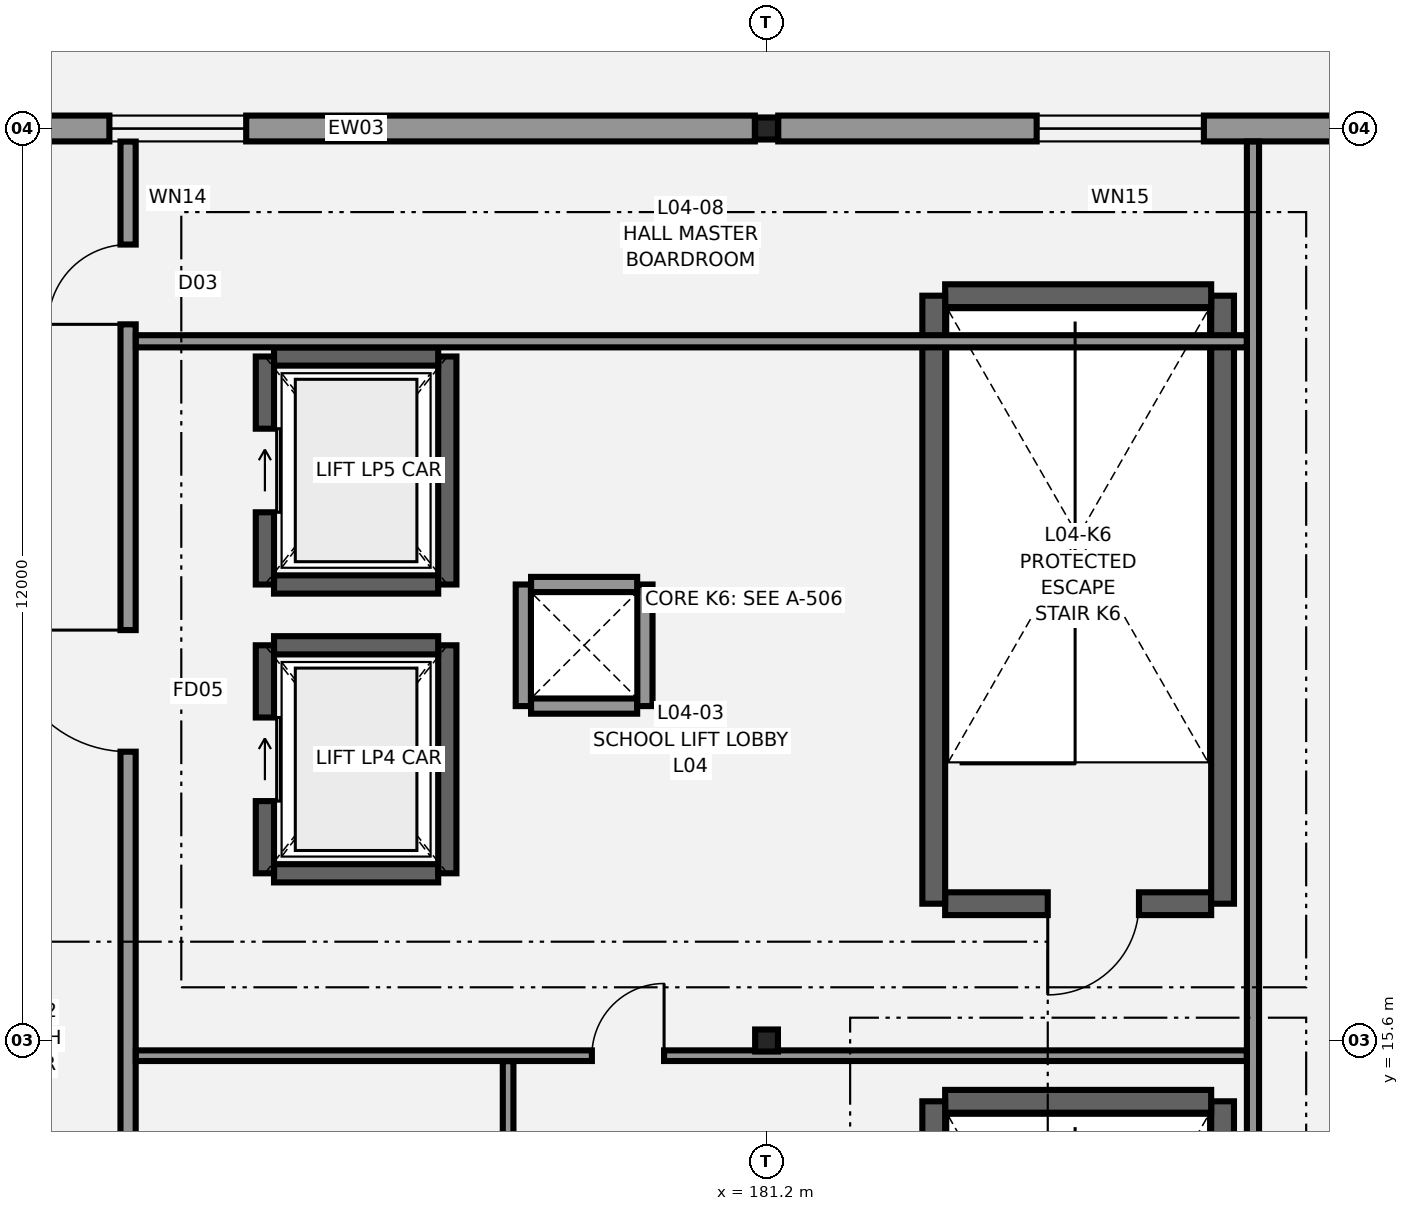
"""IFC4 building model, lengths in metres.
Left out: names, types, materials, properties, quantities, classifications, styles, units other than length and angle.
Written with IfcOpenShell. Run it as: python <this file> out.ifc"""

import sys

from ifc_helpers import new_model, si_unit, direction, frame, frame_2d, origin, origin_2d, place, context, subcontext, project, spatial, rectangle, i_section, extrude, element, fill, save


model = new_model("IFC4")
c1 = context("Model", 3, precision=1e-05, world=origin(), true_north=direction((0.0, 1.0)))
c2 = subcontext(c1, "Body", "Model", "MODEL_VIEW")
j1 = project(units=[si_unit("LENGTHUNIT", "METRE"), si_unit("PLANEANGLEUNIT", "RADIAN")], contexts=[c1])
p1 = place(None, origin())
s1 = spatial("IfcSite", under=j1, at=p1, CompositionType="ELEMENT")
p2 = place(p1, origin())
s2 = spatial("IfcBuilding", under=s1, at=p2, CompositionType="ELEMENT")
p3 = place(p2, frame((0.0, 0.0, 18.6)))
s3 = spatial("IfcBuildingStorey", under=s2, at=p3, CompositionType="ELEMENT", Elevation=18.6)
for number, where, z_axis, x_axis in (
    (1, (181.2, 15.6, 0.0), (0.0, 0.0, 1.0), (1.0, 0.0, 0.0)),
    (2, (181.2, 27.6, 0.0), (0.0, 0.0, 1.0), (1.0, 0.0, 0.0)),
):
    element("IfcColumn", number, at=place(p3, frame(where, z_axis=z_axis, x_axis=x_axis)), inside=s3, PredefinedType="COLUMN", context=c2, shape_type="SweptSolid", body=[
        extrude(i_section(OverallWidth=0.3, OverallDepth=0.29, WebThickness=0.009, FlangeThickness=0.014, FilletRadius=0.027, at=origin_2d()), origin(), (0.0, 0.0, 1.0), 2.9),
    ])
p4 = place(p3, frame((187.2, 6.8, 0.0), z_axis=(0.0, 0.0, 1.0), x_axis=(0.0, 1.0, 0.0)))
e3 = element("IfcWall", 3, at=p4, inside=s3, PredefinedType="SHEAR", context=c2, shape_type="SweptSolid", body=[
    extrude(rectangle(XDim=8.0, YDim=0.3, at=frame_2d((4.0, 0.0))), origin(), (0.0, 0.0, 1.0), 2.7),
])
p5 = place(p3, frame((187.05, 14.8, 0.0), z_axis=(0.0, 0.0, 1.0), x_axis=(-1.0, 0.0, 0.0)))
e4 = element("IfcWall", 4, at=p5, inside=s3, PredefinedType="SHEAR", context=c2, shape_type="SweptSolid", body=[
    extrude(rectangle(XDim=3.5, YDim=0.3, at=frame_2d((1.75, 0.0))), origin(), (0.0, 0.0, 1.0), 2.7),
])
p6 = place(p3, frame((183.4, 14.8, 0.0), z_axis=(0.0, 0.0, 1.0), x_axis=(0.0, -1.0, 0.0)))
e5 = element("IfcWall", 5, at=p6, inside=s3, PredefinedType="SHEAR", context=c2, shape_type="SweptSolid", body=[
    extrude(rectangle(XDim=8.0, YDim=0.3, at=frame_2d((4.0, 0.0))), origin(), (0.0, 0.0, 1.0), 2.7),
])
p7 = place(p3, frame((187.05, 17.4, 0.0), z_axis=(0.0, 0.0, 1.0), x_axis=(-1.0, 0.0, 0.0)))
e6 = element("IfcWall", 6, at=p7, inside=s3, PredefinedType="SHEAR", context=c2, shape_type="SweptSolid", body=[
    extrude(rectangle(XDim=3.5, YDim=0.3, at=frame_2d((1.75, 0.0))), origin(), (0.0, 0.0, 1.0), 2.7),
])
p8 = place(p7, frame((0.95, 0.0, 0.0)))
e7 = element("IfcOpeningElement", 7, at=p8, cuts=e6, PredefinedType="OPENING", context=c2, shape_type="SweptSolid", body=[
    extrude(rectangle(XDim=1.2, YDim=2.2, at=frame_2d((0.6, 1.1))), frame((0.0, 0.16, 0.0), z_axis=(0.0, -1.0, 0.0), x_axis=(1.0, 0.0, 0.0)), (0.0, 0.0, 1.0), 0.32),
])
p9 = place(p3, frame((187.2, 17.4, 0.0), z_axis=(0.0, 0.0, 1.0), x_axis=(0.0, 1.0, 0.0)))
e8 = element("IfcWall", 8, at=p9, inside=s3, PredefinedType="SHEAR", context=c2, shape_type="SweptSolid", body=[
    extrude(rectangle(XDim=8.0, YDim=0.3, at=frame_2d((4.0, 0.0))), origin(), (0.0, 0.0, 1.0), 2.7),
])
p10 = place(p3, frame((187.05, 25.4, 0.0), z_axis=(0.0, 0.0, 1.0), x_axis=(-1.0, 0.0, 0.0)))
e9 = element("IfcWall", 9, at=p10, inside=s3, PredefinedType="SHEAR", context=c2, shape_type="SweptSolid", body=[
    extrude(rectangle(XDim=3.5, YDim=0.3, at=frame_2d((1.75, 0.0))), origin(), (0.0, 0.0, 1.0), 2.7),
])
p11 = place(p3, frame((183.4, 25.4, 0.0), z_axis=(0.0, 0.0, 1.0), x_axis=(0.0, -1.0, 0.0)))
e10 = element("IfcWall", 10, at=p11, inside=s3, PredefinedType="SHEAR", context=c2, shape_type="SweptSolid", body=[
    extrude(rectangle(XDim=8.0, YDim=0.3, at=frame_2d((4.0, 0.0))), origin(), (0.0, 0.0, 1.0), 2.7),
])
p12 = place(p3, frame((174.72, 17.8, 0.0), z_axis=(0.0, 0.0, 1.0), x_axis=(1.0, 0.0, 0.0)))
e11 = element("IfcWall", 11, at=p12, inside=s3, PredefinedType="SHEAR", context=c2, shape_type="SweptSolid", body=[
    extrude(rectangle(XDim=2.16, YDim=0.24, at=frame_2d((1.08, 0.0))), origin(), (0.0, 0.0, 1.0), 2.7),
])
p13 = place(p3, frame((177.0, 17.8, 0.0), z_axis=(0.0, 0.0, 1.0), x_axis=(0.0, 1.0, 0.0)))
e12 = element("IfcWall", 12, at=p13, inside=s3, PredefinedType="SHEAR", context=c2, shape_type="SweptSolid", body=[
    extrude(rectangle(XDim=3.0, YDim=0.24, at=frame_2d((1.5, 0.0))), origin(), (0.0, 0.0, 1.0), 2.7),
])
p14 = place(p3, frame((176.88, 20.8, 0.0), z_axis=(0.0, 0.0, 1.0), x_axis=(-1.0, 0.0, 0.0)))
e13 = element("IfcWall", 13, at=p14, inside=s3, PredefinedType="SHEAR", context=c2, shape_type="SweptSolid", body=[
    extrude(rectangle(XDim=2.16, YDim=0.24, at=frame_2d((1.08, 0.0))), origin(), (0.0, 0.0, 1.0), 2.7),
])
p15 = place(p3, frame((174.6, 20.8, 0.0), z_axis=(0.0, 0.0, 1.0), x_axis=(0.0, -1.0, 0.0)))
e14 = element("IfcWall", 14, at=p15, inside=s3, PredefinedType="SHEAR", context=c2, shape_type="SweptSolid", body=[
    extrude(rectangle(XDim=3.0, YDim=0.24, at=frame_2d((1.5, 0.0))), origin(), (0.0, 0.0, 1.0), 2.7),
])
p16 = place(p15, frame((0.95, 0.0, 0.0)))
e15 = element("IfcOpeningElement", 15, at=p16, cuts=e14, PredefinedType="OPENING", context=c2, shape_type="SweptSolid", body=[
    extrude(rectangle(XDim=1.1, YDim=2.1, at=frame_2d((0.55, 1.05))), frame((0.0, 0.13, 0.0), z_axis=(0.0, -1.0, 0.0), x_axis=(1.0, 0.0, 0.0)), (0.0, 0.0, 1.0), 0.26),
])
p17 = place(p3, frame((174.72, 21.6, 0.0), z_axis=(0.0, 0.0, 1.0), x_axis=(1.0, 0.0, 0.0)))
e16 = element("IfcWall", 16, at=p17, inside=s3, PredefinedType="SHEAR", context=c2, shape_type="SweptSolid", body=[
    extrude(rectangle(XDim=2.16, YDim=0.24, at=frame_2d((1.08, 0.0))), origin(), (0.0, 0.0, 1.0), 2.7),
])
p18 = place(p3, frame((177.0, 21.6, 0.0), z_axis=(0.0, 0.0, 1.0), x_axis=(0.0, 1.0, 0.0)))
e17 = element("IfcWall", 17, at=p18, inside=s3, PredefinedType="SHEAR", context=c2, shape_type="SweptSolid", body=[
    extrude(rectangle(XDim=3.0, YDim=0.24, at=frame_2d((1.5, 0.0))), origin(), (0.0, 0.0, 1.0), 2.7),
])
p19 = place(p3, frame((176.88, 24.6, 0.0), z_axis=(0.0, 0.0, 1.0), x_axis=(-1.0, 0.0, 0.0)))
e18 = element("IfcWall", 18, at=p19, inside=s3, PredefinedType="SHEAR", context=c2, shape_type="SweptSolid", body=[
    extrude(rectangle(XDim=2.16, YDim=0.24, at=frame_2d((1.08, 0.0))), origin(), (0.0, 0.0, 1.0), 2.7),
])
p20 = place(p3, frame((174.6, 24.6, 0.0), z_axis=(0.0, 0.0, 1.0), x_axis=(0.0, -1.0, 0.0)))
e19 = element("IfcWall", 19, at=p20, inside=s3, PredefinedType="SHEAR", context=c2, shape_type="SweptSolid", body=[
    extrude(rectangle(XDim=3.0, YDim=0.24, at=frame_2d((1.5, 0.0))), origin(), (0.0, 0.0, 1.0), 2.7),
])
p21 = place(p20, frame((0.95, 0.0, 0.0)))
e20 = element("IfcOpeningElement", 20, at=p21, cuts=e19, PredefinedType="OPENING", context=c2, shape_type="SweptSolid", body=[
    extrude(rectangle(XDim=1.1, YDim=2.1, at=frame_2d((0.55, 1.05))), frame((0.0, 0.13, 0.0), z_axis=(0.0, -1.0, 0.0), x_axis=(1.0, 0.0, 0.0)), (0.0, 0.0, 1.0), 0.26),
])
p22 = place(p3, frame((170.554, 27.6, 0.0), z_axis=(0.0, 0.0, 1.0), x_axis=(1.0, 0.0, 0.0)))
e21 = element("IfcWall", 21, at=p22, inside=s3, PredefinedType="STANDARD", context=c2, shape_type="SweptSolid", body=[
    extrude(rectangle(XDim=10.492, YDim=0.34, at=frame_2d((5.246, 0.0))), origin(), (0.0, 0.0, 1.0), 2.45),
])
p23 = place(p22, frame((2.0, 0.0, 0.8)))
e22 = element("IfcOpeningElement", 22, at=p23, cuts=e21, PredefinedType="OPENING", context=c2, shape_type="SweptSolid", body=[
    extrude(rectangle(XDim=1.8, YDim=1.4, at=frame_2d((0.9, 0.7))), frame((0.0, 0.18, 0.0), z_axis=(0.0, -1.0, 0.0), x_axis=(1.0, 0.0, 0.0)), (0.0, 0.0, 1.0), 0.36),
])
p24 = place(p3, frame((181.354, 27.6, 0.0), z_axis=(0.0, 0.0, 1.0), x_axis=(1.0, 0.0, 0.0)))
e23 = element("IfcWall", 23, at=p24, inside=s3, PredefinedType="STANDARD", context=c2, shape_type="SweptSolid", body=[
    extrude(rectangle(XDim=10.492, YDim=0.34, at=frame_2d((5.246, 0.0))), origin(), (0.0, 0.0, 1.0), 2.45),
])
p25 = place(p24, frame((3.4, 0.0, 0.8)))
e24 = element("IfcOpeningElement", 24, at=p25, cuts=e23, PredefinedType="OPENING", context=c2, shape_type="SweptSolid", body=[
    extrude(rectangle(XDim=2.2, YDim=1.4, at=frame_2d((1.1, 0.7))), frame((0.0, 0.18, 0.0), z_axis=(0.0, -1.0, 0.0), x_axis=(1.0, 0.0, 0.0)), (0.0, 0.0, 1.0), 0.36),
])
p26 = place(p3, frame((187.6, 0.192, 0.0), z_axis=(0.0, 0.0, 1.0), x_axis=(0.0, 1.0, 0.0)))
e25 = element("IfcWall", 25, at=p26, inside=s3, PredefinedType="PARTITIONING", context=c2, shape_type="SweptSolid", body=[
    extrude(rectangle(XDim=27.236, YDim=0.16, at=frame_2d((13.618, 0.0))), origin(), (0.0, 0.0, 1.0), 2.45),
])
p27 = place(p26, frame((4.9, 0.0, 0.0)))
e26 = element("IfcOpeningElement", 26, at=p27, cuts=e25, PredefinedType="OPENING", context=c2, shape_type="SweptSolid", body=[
    extrude(rectangle(XDim=1.15, YDim=2.15, at=frame_2d((0.575, 1.075))), frame((0.0, 0.09, 0.0), z_axis=(0.0, -1.0, 0.0), x_axis=(1.0, 0.0, 0.0)), (0.0, 0.0, 1.0), 0.18),
])
p28 = place(p3, frame((172.8, 6.8, 0.0), z_axis=(0.0, 0.0, 1.0), x_axis=(0.0, 1.0, 0.0)))
e27 = element("IfcWall", 27, at=p28, inside=s3, PredefinedType="PARTITIONING", context=c2, shape_type="SweptSolid", body=[
    extrude(rectangle(XDim=20.628, YDim=0.2, at=frame_2d((10.314, 0.0))), origin(), (0.0, 0.0, 1.0), 2.45),
])
p29 = place(p28, frame((1.8, 0.0, 0.0)))
e28 = element("IfcOpeningElement", 28, at=p29, cuts=e27, PredefinedType="OPENING", context=c2, shape_type="SweptSolid", body=[
    extrude(rectangle(XDim=1.15, YDim=2.15, at=frame_2d((0.575, 1.075))), frame((0.0, 0.11, 0.0), z_axis=(0.0, -1.0, 0.0), x_axis=(1.0, 0.0, 0.0)), (0.0, 0.0, 1.0), 0.22),
])
p30 = place(p28, frame((5.533, 0.0, 0.0)))
e29 = element("IfcOpeningElement", 29, at=p30, cuts=e27, PredefinedType="OPENING", context=c2, shape_type="SweptSolid", body=[
    extrude(rectangle(XDim=1.02, YDim=2.12, at=frame_2d((0.51, 1.06))), frame((0.0, 0.11, 0.0), z_axis=(0.0, -1.0, 0.0), x_axis=(1.0, 0.0, 0.0)), (0.0, 0.0, 1.0), 0.22),
])
p31 = place(p28, frame((12.6, 0.0, 0.0)))
e30 = element("IfcOpeningElement", 30, at=p31, cuts=e27, PredefinedType="OPENING", context=c2, shape_type="SweptSolid", body=[
    extrude(rectangle(XDim=1.6, YDim=2.2, at=frame_2d((0.8, 1.1))), frame((0.0, 0.11, 0.0), z_axis=(0.0, -1.0, 0.0), x_axis=(1.0, 0.0, 0.0)), (0.0, 0.0, 1.0), 0.22),
])
p32 = place(p28, frame((18.223, 0.0, 0.0)))
e31 = element("IfcOpeningElement", 31, at=p32, cuts=e27, PredefinedType="OPENING", context=c2, shape_type="SweptSolid", body=[
    extrude(rectangle(XDim=1.05, YDim=2.15, at=frame_2d((0.525, 1.075))), frame((0.0, 0.11, 0.0), z_axis=(0.0, -1.0, 0.0), x_axis=(1.0, 0.0, 0.0)), (0.0, 0.0, 1.0), 0.22),
])
p33 = place(p3, frame((172.902, 15.4, 0.0), z_axis=(0.0, 0.0, 1.0), x_axis=(1.0, 0.0, 0.0)))
e32 = element("IfcWall", 32, at=p33, inside=s3, PredefinedType="PARTITIONING", context=c2, shape_type="SweptSolid", body=[
    extrude(rectangle(XDim=14.616, YDim=0.14, at=frame_2d((7.308, 0.0))), origin(), (0.0, 0.0, 1.0), 2.45),
])
p34 = place(p33, frame((6.0, 0.0, 0.0)))
e33 = element("IfcOpeningElement", 33, at=p34, cuts=e32, PredefinedType="OPENING", context=c2, shape_type="SweptSolid", body=[
    extrude(rectangle(XDim=0.95, YDim=2.1, at=frame_2d((0.475, 1.05))), frame((0.0, 0.08, 0.0), z_axis=(0.0, -1.0, 0.0), x_axis=(1.0, 0.0, 0.0)), (0.0, 0.0, 1.0), 0.16),
])
p35 = place(p3, frame((177.8, 11.472, 0.0), z_axis=(0.0, 0.0, 1.0), x_axis=(0.0, 1.0, 0.0)))
e34 = element("IfcWall", 34, at=p35, inside=s3, PredefinedType="PARTITIONING", context=c2, shape_type="SweptSolid", body=[
    extrude(rectangle(XDim=3.856, YDim=0.14, at=frame_2d((1.928, 0.0))), origin(), (0.0, 0.0, 1.0), 2.45),
])
p36 = place(p3, frame((172.902, 24.8, 0.0), z_axis=(0.0, 0.0, 1.0), x_axis=(1.0, 0.0, 0.0)))
e35 = element("IfcWall", 35, at=p36, inside=s3, PredefinedType="PARTITIONING", context=c2, shape_type="SweptSolid", body=[
    extrude(rectangle(XDim=14.616, YDim=0.16, at=frame_2d((7.308, 0.0))), origin(), (0.0, 0.0, 1.0), 2.45),
])
p37 = place(p3, frame((178.102, 20.0, 0.0), z_axis=(0.0, 0.0, 1.0), x_axis=(1.0, 0.0, 0.0)))
e36 = element("IfcWall", 36, at=p37, inside=s3, PredefinedType="PARTITIONING", context=c2, shape_type="SweptSolid", body=[
    extrude(rectangle(XDim=1.396, YDim=0.2, at=frame_2d((0.698, 0.0))), origin(), (0.0, 0.0, 1.0), 2.45),
])
p38 = place(p3, frame((179.6, 20.0, 0.0), z_axis=(0.0, 0.0, 1.0), x_axis=(0.0, 1.0, 0.0)))
e37 = element("IfcWall", 37, at=p38, inside=s3, PredefinedType="PARTITIONING", context=c2, shape_type="SweptSolid", body=[
    extrude(rectangle(XDim=1.6, YDim=0.2, at=frame_2d((0.8, 0.0))), origin(), (0.0, 0.0, 1.0), 2.45),
])
p39 = place(p3, frame((179.498, 21.6, 0.0), z_axis=(0.0, 0.0, 1.0), x_axis=(-1.0, 0.0, 0.0)))
e38 = element("IfcWall", 38, at=p39, inside=s3, PredefinedType="PARTITIONING", context=c2, shape_type="SweptSolid", body=[
    extrude(rectangle(XDim=1.396, YDim=0.2, at=frame_2d((0.698, 0.0))), origin(), (0.0, 0.0, 1.0), 2.45),
])
p40 = place(p3, frame((178.0, 21.6, 0.0), z_axis=(0.0, 0.0, 1.0), x_axis=(0.0, -1.0, 0.0)))
e39 = element("IfcWall", 39, at=p40, inside=s3, PredefinedType="PARTITIONING", context=c2, shape_type="SweptSolid", body=[
    extrude(rectangle(XDim=1.6, YDim=0.2, at=frame_2d((0.8, 0.0))), origin(), (0.0, 0.0, 1.0), 2.45),
])
p41 = place(p23, origin())
e40 = element("IfcWindow", 40, at=p41, inside=s3, PartitioningType="SINGLE_PANEL", PredefinedType="WINDOW", context=c2, shape_type="SweptSolid", body=[
    extrude(rectangle(XDim=1.8, YDim=1.4, at=frame_2d((0.9, 0.7))), frame((0.0, 0.03, 0.0), z_axis=(0.0, -1.0, 0.0), x_axis=(1.0, 0.0, 0.0)), (0.0, 0.0, 1.0), 0.06),
])
fill(e22, e40)
p42 = place(p25, origin())
e41 = element("IfcWindow", 41, at=p42, inside=s3, PartitioningType="SINGLE_PANEL", PredefinedType="WINDOW", context=c2, shape_type="SweptSolid", body=[
    extrude(rectangle(XDim=2.2, YDim=1.4, at=frame_2d((1.1, 0.7))), frame((0.0, 0.03, 0.0), z_axis=(0.0, -1.0, 0.0), x_axis=(1.0, 0.0, 0.0)), (0.0, 0.0, 1.0), 0.06),
])
fill(e24, e41)
p43 = place(p31, origin())
e42 = element("IfcDoor", 42, at=p43, inside=s3, OperationType="SINGLE_SWING_RIGHT", PredefinedType="DOOR", context=c2, shape_type="SweptSolid", body=[
    extrude(rectangle(XDim=1.6, YDim=2.2, at=frame_2d((0.8, 1.1))), frame((0.0, 0.025, 0.0), z_axis=(0.0, -1.0, 0.0), x_axis=(1.0, 0.0, 0.0)), (0.0, 0.0, 1.0), 0.05),
])
fill(e30, e42)
p44 = place(p32, origin())
e43 = element("IfcDoor", 43, at=p44, inside=s3, OperationType="SINGLE_SWING_LEFT", PredefinedType="DOOR", context=c2, shape_type="SweptSolid", body=[
    extrude(rectangle(XDim=1.05, YDim=2.15, at=frame_2d((0.525, 1.075))), frame((0.0, 0.025, 0.0), z_axis=(0.0, -1.0, 0.0), x_axis=(1.0, 0.0, 0.0)), (0.0, 0.0, 1.0), 0.05),
])
fill(e31, e43)
p45 = place(p34, origin())
e44 = element("IfcDoor", 44, at=p45, inside=s3, OperationType="SINGLE_SWING_RIGHT", PredefinedType="DOOR", context=c2, shape_type="SweptSolid", body=[
    extrude(rectangle(XDim=0.95, YDim=2.1, at=frame_2d((0.475, 1.05))), frame((0.0, 0.025, 0.0), z_axis=(0.0, -1.0, 0.0), x_axis=(1.0, 0.0, 0.0)), (0.0, 0.0, 1.0), 0.05),
])
fill(e33, e44)
p46 = place(p8, origin())
e45 = element("IfcDoor", 45, at=p46, inside=s3, OperationType="SINGLE_SWING_RIGHT", PredefinedType="DOOR", context=c2, shape_type="SweptSolid", body=[
    extrude(rectangle(XDim=1.2, YDim=2.2, at=frame_2d((0.6, 1.1))), frame((0.0, 0.025, 0.0), z_axis=(0.0, -1.0, 0.0), x_axis=(1.0, 0.0, 0.0)), (0.0, 0.0, 1.0), 0.05),
])
fill(e7, e45)
p47 = place(p16, origin())
e46 = element("IfcDoor", 46, at=p47, inside=s3, OperationType="SLIDING_TO_LEFT", PredefinedType="DOOR", context=c2, shape_type="SweptSolid", body=[
    extrude(rectangle(XDim=1.1, YDim=2.1, at=frame_2d((0.55, 1.05))), frame((0.0, 0.025, 0.0), z_axis=(0.0, -1.0, 0.0), x_axis=(1.0, 0.0, 0.0)), (0.0, 0.0, 1.0), 0.05),
])
fill(e15, e46)
p48 = place(p21, origin())
e47 = element("IfcDoor", 47, at=p48, inside=s3, OperationType="SLIDING_TO_LEFT", PredefinedType="DOOR", context=c2, shape_type="SweptSolid", body=[
    extrude(rectangle(XDim=1.1, YDim=2.1, at=frame_2d((0.55, 1.05))), frame((0.0, 0.025, 0.0), z_axis=(0.0, -1.0, 0.0), x_axis=(1.0, 0.0, 0.0)), (0.0, 0.0, 1.0), 0.05),
])
fill(e20, e47)
save(model, sys.argv[1])
